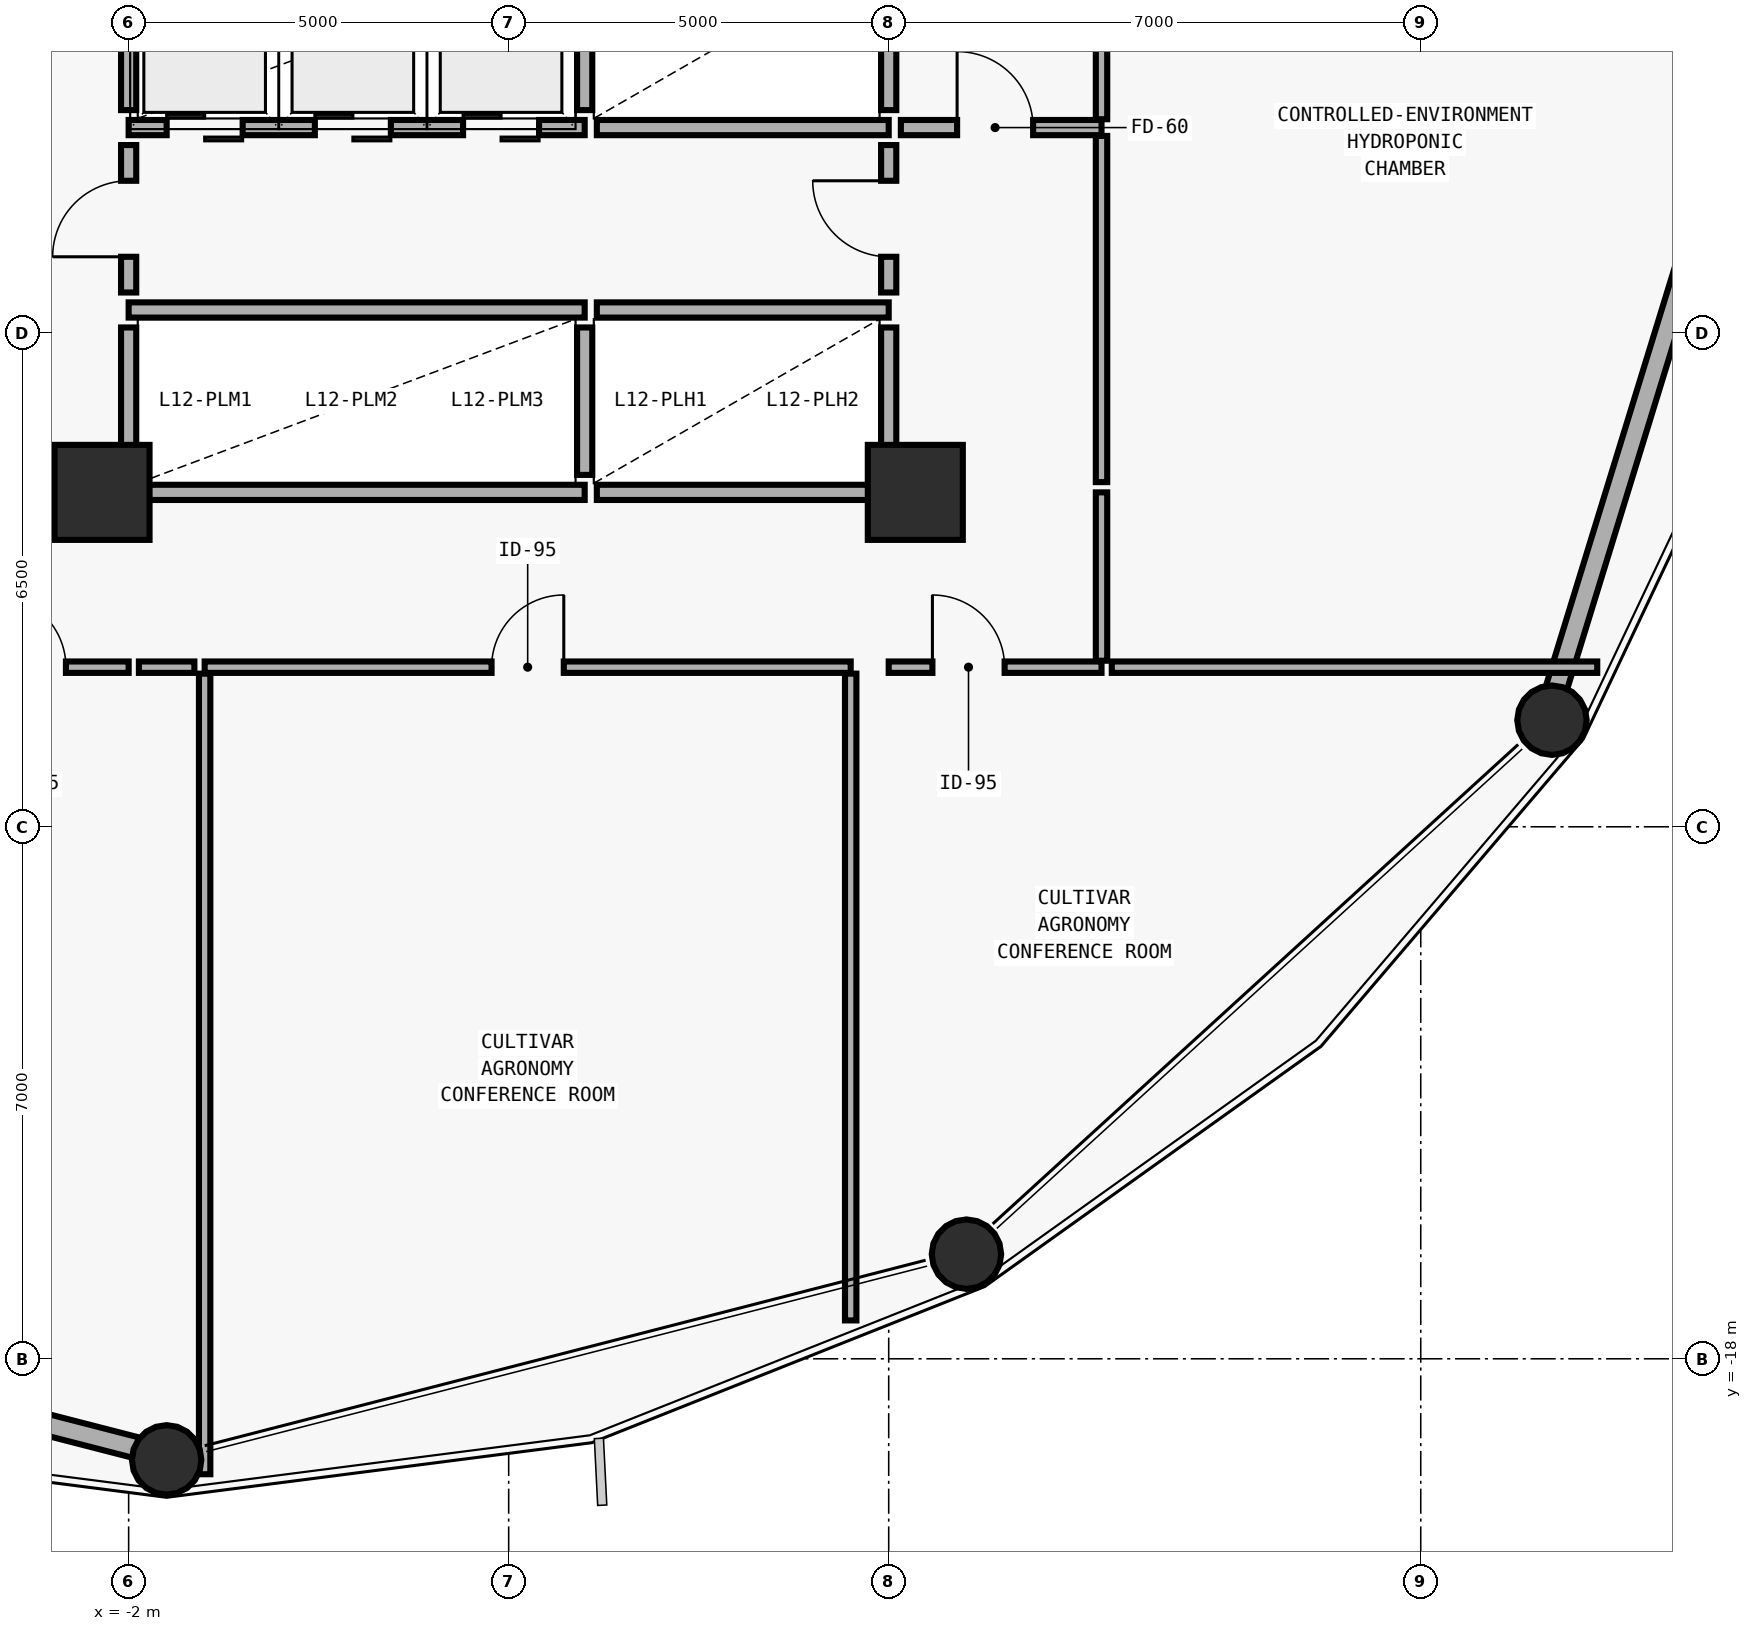
"""IFC4 building model, lengths in metres.
Left out: names, types, materials, properties, quantities, classifications, styles, units other than length and angle.
Written with IfcOpenShell. Run it as: python <this file> out.ifc"""

import sys

from ifc_helpers import new_model, si_unit, direction, frame, frame_2d, origin, origin_2d, place, context, subcontext, project, spatial, rectangle, hollow_circle, extrude, element, fill, save


model = new_model("IFC4")
c1 = context("Model", 3, precision=1e-05, world=origin(), true_north=direction((0.0, 1.0)))
c2 = subcontext(c1, "Body", "Model", "MODEL_VIEW")
j1 = project(units=[si_unit("LENGTHUNIT", "METRE"), si_unit("PLANEANGLEUNIT", "RADIAN")], contexts=[c1])
p1 = place(None, origin())
s1 = spatial("IfcSite", under=j1, at=p1, CompositionType="ELEMENT")
p2 = place(p1, origin())
s2 = spatial("IfcBuilding", under=s1, at=p2, CompositionType="ELEMENT")
p3 = place(p2, frame((0.0, 0.0, 51.0)))
s3 = spatial("IfcBuildingStorey", under=s2, at=p3, CompositionType="ELEMENT", Elevation=51.0)
for number, where, z_axis, x_axis in (
    (1, (-2.35, -6.6, 0.0), (0.0, 0.0, 1.0), (1.0, 0.0, 0.0)),
    (2, (8.35, -6.6, 0.0), (0.0, 0.0, 1.0), (1.0, 0.0, 0.0)),
):
    element("IfcColumn", number, at=place(p3, frame(where, z_axis=z_axis, x_axis=x_axis)), inside=s3, PredefinedType="COLUMN", context=c2, shape_type="SweptSolid", body=[
        extrude(rectangle(XDim=1.25, YDim=1.25, at=origin_2d()), origin(), (0.0, 0.0, 1.0), 3.875),
    ])
p4 = place(p3, frame((-1.5, -19.273, 0.0), z_axis=(0.0, -0.029410155544, 0.999567427816), x_axis=(1.0, 0.0, 0.0)))
e3 = element("IfcColumn", 3, at=p4, inside=s3, PredefinedType="COLUMN", context=c2, shape_type="SweptSolid", body=[
    extrude(hollow_circle(Radius=0.457, WallThickness=0.032, at=origin_2d()), origin(), (0.0, 0.0, 1.0), 3.877),
])
p5 = place(p3, frame((8.987, -16.574, 0.0), z_axis=(0.018828767594, -0.025440876615, 0.999498994151), x_axis=(0.803803843436, 0.594894428682, 0.0)))
e4 = element("IfcColumn", 4, at=p5, inside=s3, PredefinedType="COLUMN", context=c2, shape_type="SweptSolid", body=[
    extrude(hollow_circle(Radius=0.457, WallThickness=0.032, at=origin_2d()), origin(), (0.0, 0.0, 1.0), 3.877),
])
p6 = place(p3, frame((16.663, -9.569, 0.0), z_axis=(0.032615211628, -0.01467054886, 0.99936030688), x_axis=(0.410218260947, 0.911987378414, 0.0)))
e5 = element("IfcColumn", 5, at=p6, inside=s3, PredefinedType="COLUMN", context=c2, shape_type="SweptSolid", body=[
    extrude(hollow_circle(Radius=0.457, WallThickness=0.032, at=origin_2d()), origin(), (0.0, 0.0, 1.0), 3.877),
])
p7 = place(p3, frame((-1.899, -19.17, 0.0), z_axis=(0.0, 0.0, 1.0), x_axis=(-0.968436738327, 0.249259470952, 0.0)))
e6 = element("IfcWall", 6, at=p7, inside=s3, PredefinedType="SOLIDWALL", context=c2, shape_type="SweptSolid", body=[
    extrude(rectangle(XDim=10.004, YDim=0.28, at=frame_2d((5.002, 0.0))), origin(), (0.0, 0.0, 1.0), 3.06),
])
p8 = place(p3, frame((19.487, -0.394, 0.0), z_axis=(0.0, 0.0, 1.0), x_axis=(-0.29412506019, -0.95576694281, 0.0)))
e7 = element("IfcWall", 7, at=p8, inside=s3, PredefinedType="SOLIDWALL", context=c2, shape_type="SweptSolid", body=[
    extrude(rectangle(XDim=9.188, YDim=0.28, at=frame_2d((4.594, 0.0))), origin(), (0.0, 0.0, 1.0), 3.06),
])
p9 = place(p3, frame((-2.0, -1.8, 0.0), z_axis=(0.0, 0.0, 1.0), x_axis=(1.0, 0.0, 0.0)))
e8 = element("IfcWall", 8, at=p9, inside=s3, PredefinedType="SOLIDWALL", context=c2, shape_type="SweptSolid", body=[
    extrude(rectangle(XDim=6.0, YDim=0.2, at=frame_2d((3.0, 0.0))), origin(), (0.0, 0.0, 1.0), 3.64),
])
p10 = place(p9, frame((0.5, 0.0, 0.0)))
e9 = element("IfcOpeningElement", 9, at=p10, cuts=e8, PredefinedType="OPENING", context=c2, shape_type="SweptSolid", body=[
    extrude(rectangle(XDim=1.0, YDim=2.2, at=frame_2d((0.5, 1.1))), frame((0.0, 0.11, 0.0), z_axis=(0.0, -1.0, 0.0), x_axis=(1.0, 0.0, 0.0)), (0.0, 0.0, 1.0), 0.22),
])
p11 = place(p9, frame((2.45, 0.0, 0.0)))
e10 = element("IfcOpeningElement", 10, at=p11, cuts=e8, PredefinedType="OPENING", context=c2, shape_type="SweptSolid", body=[
    extrude(rectangle(XDim=1.0, YDim=2.2, at=frame_2d((0.5, 1.1))), frame((0.0, 0.11, 0.0), z_axis=(0.0, -1.0, 0.0), x_axis=(1.0, 0.0, 0.0)), (0.0, 0.0, 1.0), 0.22),
])
p12 = place(p9, frame((4.4, 0.0, 0.0)))
e11 = element("IfcOpeningElement", 11, at=p12, cuts=e8, PredefinedType="OPENING", context=c2, shape_type="SweptSolid", body=[
    extrude(rectangle(XDim=1.0, YDim=2.2, at=frame_2d((0.5, 1.1))), frame((0.0, 0.11, 0.0), z_axis=(0.0, -1.0, 0.0), x_axis=(1.0, 0.0, 0.0)), (0.0, 0.0, 1.0), 0.22),
])
p13 = place(p3, frame((-2.0, -1.57, 0.0), z_axis=(0.0, 0.0, 1.0), x_axis=(0.0, 1.0, 0.0)))
e12 = element("IfcWall", 12, at=p13, inside=s3, PredefinedType="SOLIDWALL", context=c2, shape_type="SweptSolid", body=[
    extrude(rectangle(XDim=2.05, YDim=0.2, at=frame_2d((1.025, 0.0))), origin(), (0.0, 0.0, 1.0), 3.022),
])
p14 = place(p3, frame((4.16, -1.8, 0.0), z_axis=(0.0, 0.0, 1.0), x_axis=(1.0, 0.0, 0.0)))
e13 = element("IfcWall", 13, at=p14, inside=s3, PredefinedType="SOLIDWALL", context=c2, shape_type="SweptSolid", body=[
    extrude(rectangle(XDim=3.84, YDim=0.2, at=frame_2d((1.92, 0.0))), origin(), (0.0, 0.0, 1.0), 3.64),
])
p15 = place(p3, frame((4.0, -1.57, 0.0), z_axis=(0.0, 0.0, 1.0), x_axis=(0.0, 1.0, 0.0)))
e14 = element("IfcWall", 14, at=p15, inside=s3, PredefinedType="SOLIDWALL", context=c2, shape_type="SweptSolid", body=[
    extrude(rectangle(XDim=1.94, YDim=0.2, at=frame_2d((0.97, 0.0))), origin(), (0.0, 0.0, 1.0), 3.64),
])
p16 = place(p3, frame((8.0, -1.57, 0.0), z_axis=(0.0, 0.0, 1.0), x_axis=(0.0, 1.0, 0.0)))
e15 = element("IfcWall", 15, at=p16, inside=s3, PredefinedType="SOLIDWALL", context=c2, shape_type="SweptSolid", body=[
    extrude(rectangle(XDim=2.05, YDim=0.2, at=frame_2d((1.025, 0.0))), origin(), (0.0, 0.0, 1.0), 3.072),
])
p17 = place(p3, frame((-2.0, -4.2, 0.0), z_axis=(0.0, 0.0, 1.0), x_axis=(1.0, 0.0, 0.0)))
e16 = element("IfcWall", 16, at=p17, inside=s3, PredefinedType="SOLIDWALL", context=c2, shape_type="SweptSolid", body=[
    extrude(rectangle(XDim=6.0, YDim=0.2, at=frame_2d((3.0, 0.0))), origin(), (0.0, 0.0, 1.0), 3.64),
])
p18 = place(p3, frame((-2.0, -6.6, 0.0), z_axis=(0.0, 0.0, 1.0), x_axis=(1.0, 0.0, 0.0)))
e17 = element("IfcWall", 17, at=p18, inside=s3, PredefinedType="SOLIDWALL", context=c2, shape_type="SweptSolid", body=[
    extrude(rectangle(XDim=6.0, YDim=0.2, at=frame_2d((3.0, 0.0))), origin(), (0.0, 0.0, 1.0), 3.122),
])
p19 = place(p3, frame((-2.0, -6.37, 0.0), z_axis=(0.0, 0.0, 1.0), x_axis=(0.0, 1.0, 0.0)))
e18 = element("IfcWall", 18, at=p19, inside=s3, PredefinedType="SOLIDWALL", context=c2, shape_type="SweptSolid", body=[
    extrude(rectangle(XDim=1.94, YDim=0.2, at=frame_2d((0.97, 0.0))), origin(), (0.0, 0.0, 1.0), 3.022),
])
p20 = place(p3, frame((4.16, -4.2, 0.0), z_axis=(0.0, 0.0, 1.0), x_axis=(1.0, 0.0, 0.0)))
e19 = element("IfcWall", 19, at=p20, inside=s3, PredefinedType="SOLIDWALL", context=c2, shape_type="SweptSolid", body=[
    extrude(rectangle(XDim=3.84, YDim=0.2, at=frame_2d((1.92, 0.0))), origin(), (0.0, 0.0, 1.0), 3.64),
])
p21 = place(p3, frame((4.16, -6.6, 0.0), z_axis=(0.0, 0.0, 1.0), x_axis=(1.0, 0.0, 0.0)))
e20 = element("IfcWall", 20, at=p21, inside=s3, PredefinedType="SOLIDWALL", context=c2, shape_type="SweptSolid", body=[
    extrude(rectangle(XDim=3.84, YDim=0.2, at=frame_2d((1.92, 0.0))), origin(), (0.0, 0.0, 1.0), 3.122),
])
p22 = place(p3, frame((4.0, -6.37, 0.0), z_axis=(0.0, 0.0, 1.0), x_axis=(0.0, 1.0, 0.0)))
e21 = element("IfcWall", 21, at=p22, inside=s3, PredefinedType="SOLIDWALL", context=c2, shape_type="SweptSolid", body=[
    extrude(rectangle(XDim=1.94, YDim=0.2, at=frame_2d((0.97, 0.0))), origin(), (0.0, 0.0, 1.0), 3.64),
])
p23 = place(p3, frame((8.0, -6.37, 0.0), z_axis=(0.0, 0.0, 1.0), x_axis=(0.0, 1.0, 0.0)))
e22 = element("IfcWall", 22, at=p23, inside=s3, PredefinedType="SOLIDWALL", context=c2, shape_type="SweptSolid", body=[
    extrude(rectangle(XDim=1.94, YDim=0.2, at=frame_2d((0.97, 0.0))), origin(), (0.0, 0.0, 1.0), 3.072),
])
p24 = place(p3, frame((-2.0, -3.97, 0.0), z_axis=(0.0, 0.0, 1.0), x_axis=(0.0, 1.0, 0.0)))
e23 = element("IfcWall", 23, at=p24, inside=s3, PredefinedType="MOVABLE", context=c2, shape_type="SweptSolid", body=[
    extrude(rectangle(XDim=1.94, YDim=0.2, at=frame_2d((0.97, 0.0))), origin(), (0.0, 0.0, 1.0), 3.022),
])
p25 = place(p24, frame((0.47, 0.0, 0.0)))
e24 = element("IfcOpeningElement", 24, at=p25, cuts=e23, PredefinedType="OPENING", context=c2, shape_type="SweptSolid", body=[
    extrude(rectangle(XDim=1.0, YDim=2.1, at=frame_2d((0.5, 1.05))), frame((0.0, 0.11, 0.0), z_axis=(0.0, -1.0, 0.0), x_axis=(1.0, 0.0, 0.0)), (0.0, 0.0, 1.0), 0.22),
])
p26 = place(p3, frame((8.0, -3.97, 0.0), z_axis=(0.0, 0.0, 1.0), x_axis=(0.0, 1.0, 0.0)))
e25 = element("IfcWall", 25, at=p26, inside=s3, PredefinedType="MOVABLE", context=c2, shape_type="SweptSolid", body=[
    extrude(rectangle(XDim=1.94, YDim=0.2, at=frame_2d((0.97, 0.0))), origin(), (0.0, 0.0, 1.0), 3.072),
])
p27 = place(p26, frame((0.47, 0.0, 0.0)))
e26 = element("IfcOpeningElement", 26, at=p27, cuts=e25, PredefinedType="OPENING", context=c2, shape_type="SweptSolid", body=[
    extrude(rectangle(XDim=1.0, YDim=2.1, at=frame_2d((0.5, 1.05))), frame((0.0, 0.11, 0.0), z_axis=(0.0, -1.0, 0.0), x_axis=(1.0, 0.0, 0.0)), (0.0, 0.0, 1.0), 0.22),
])
p28 = place(p3, frame((8.16, -1.8, 0.0), z_axis=(0.0, 0.0, 1.0), x_axis=(1.0, 0.0, 0.0)))
e27 = element("IfcWall", 27, at=p28, inside=s3, PredefinedType="MOVABLE", context=c2, shape_type="SweptSolid", body=[
    extrude(rectangle(XDim=2.64, YDim=0.2, at=frame_2d((1.32, 0.0))), origin(), (0.0, 0.0, 1.0), 3.64),
])
p29 = place(p28, frame((0.74, 0.0, 0.0)))
e28 = element("IfcOpeningElement", 28, at=p29, cuts=e27, PredefinedType="OPENING", context=c2, shape_type="SweptSolid", body=[
    extrude(rectangle(XDim=1.0, YDim=2.1, at=frame_2d((0.5, 1.05))), frame((0.0, 0.11, 0.0), z_axis=(0.0, -1.0, 0.0), x_axis=(1.0, 0.0, 0.0)), (0.0, 0.0, 1.0), 0.22),
])
p30 = place(p3, frame((-4.6, -8.9, 0.0), z_axis=(0.0, 0.0, 1.0), x_axis=(1.0, 0.0, 0.0)))
e29 = element("IfcWall", 29, at=p30, inside=s3, PredefinedType="PARTITIONING", context=c2, shape_type="SweptSolid", body=[
    extrude(rectangle(XDim=2.6, YDim=0.15, at=frame_2d((1.3, 0.0))), origin(), (0.0, 0.0, 1.0), 3.64),
])
p31 = place(p30, frame((0.825, 0.0, 0.0)))
e30 = element("IfcOpeningElement", 30, at=p31, cuts=e29, PredefinedType="OPENING", context=c2, shape_type="SweptSolid", body=[
    extrude(rectangle(XDim=0.95, YDim=2.1, at=frame_2d((0.475, 1.05))), frame((0.0, 0.085, 0.0), z_axis=(0.0, -1.0, 0.0), x_axis=(1.0, 0.0, 0.0)), (0.0, 0.0, 1.0), 0.17),
])
p32 = place(p3, frame((-1.0, -8.9, 0.0), z_axis=(0.0, 0.0, 1.0), x_axis=(1.0, 0.0, 0.0)))
e31 = element("IfcWall", 31, at=p32, inside=s3, PredefinedType="PARTITIONING", context=c2, shape_type="SweptSolid", body=[
    extrude(rectangle(XDim=8.5, YDim=0.15, at=frame_2d((4.25, 0.0))), origin(), (0.0, 0.0, 1.0), 3.64),
])
p33 = place(p32, frame((3.775, 0.0, 0.0)))
e32 = element("IfcOpeningElement", 32, at=p33, cuts=e31, PredefinedType="OPENING", context=c2, shape_type="SweptSolid", body=[
    extrude(rectangle(XDim=0.95, YDim=2.1, at=frame_2d((0.475, 1.05))), frame((0.0, 0.085, 0.0), z_axis=(0.0, -1.0, 0.0), x_axis=(1.0, 0.0, 0.0)), (0.0, 0.0, 1.0), 0.17),
])
p34 = place(p3, frame((8.0, -8.9, 0.0), z_axis=(0.0, 0.0, 1.0), x_axis=(1.0, 0.0, 0.0)))
e33 = element("IfcWall", 33, at=p34, inside=s3, PredefinedType="PARTITIONING", context=c2, shape_type="SweptSolid", body=[
    extrude(rectangle(XDim=2.8, YDim=0.15, at=frame_2d((1.4, 0.0))), origin(), (0.0, 0.0, 1.0), 3.64),
])
p35 = place(p34, frame((0.575, 0.0, 0.0)))
e34 = element("IfcOpeningElement", 34, at=p35, cuts=e33, PredefinedType="OPENING", context=c2, shape_type="SweptSolid", body=[
    extrude(rectangle(XDim=0.95, YDim=2.1, at=frame_2d((0.475, 1.05))), frame((0.0, 0.085, 0.0), z_axis=(0.0, -1.0, 0.0), x_axis=(1.0, 0.0, 0.0)), (0.0, 0.0, 1.0), 0.17),
])
p36 = place(p3, frame((10.8, -1.69, 0.0), z_axis=(0.0, 0.0, 1.0), x_axis=(0.0, 1.0, 0.0)))
e35 = element("IfcWall", 35, at=p36, inside=s3, PredefinedType="PARTITIONING", context=c2, shape_type="SweptSolid", body=[
    extrude(rectangle(XDim=5.19, YDim=0.15, at=frame_2d((2.595, 0.0))), origin(), (0.0, 0.0, 1.0), 3.64),
])
p37 = place(p36, frame((2.065, 0.0, 0.0)))
e36 = element("IfcOpeningElement", 36, at=p37, cuts=e35, PredefinedType="OPENING", context=c2, shape_type="SweptSolid", body=[
    extrude(rectangle(XDim=0.95, YDim=2.1, at=frame_2d((0.475, 1.05))), frame((0.0, 0.085, 0.0), z_axis=(0.0, -1.0, 0.0), x_axis=(1.0, 0.0, 0.0)), (0.0, 0.0, 1.0), 0.17),
])
p38 = place(p3, frame((-1.865, -8.9, 0.0), z_axis=(0.0, 0.0, 1.0), x_axis=(1.0, 0.0, 0.0)))
e37 = element("IfcWall", 37, at=p38, inside=s3, PredefinedType="PARTITIONING", context=c2, shape_type="SweptSolid", body=[
    extrude(rectangle(XDim=0.73, YDim=0.15, at=frame_2d((0.365, 0.0))), origin(), (0.0, 0.0, 1.0), 3.64),
])
p39 = place(p3, frame((-1.0, -8.985, 0.0), z_axis=(0.0, 0.0, 1.0), x_axis=(0.0, -1.0, 0.0)))
e38 = element("IfcWall", 38, at=p39, inside=s3, PredefinedType="PARTITIONING", context=c2, shape_type="SweptSolid", body=[
    extrude(rectangle(XDim=10.534, YDim=0.15, at=frame_2d((5.267, 0.0))), origin(), (0.0, 0.0, 1.0), 2.972),
])
p40 = place(p3, frame((7.5, -8.985, 0.0), z_axis=(0.0, 0.0, 1.0), x_axis=(0.0, -1.0, 0.0)))
e39 = element("IfcWall", 39, at=p40, inside=s3, PredefinedType="PARTITIONING", context=c2, shape_type="SweptSolid", body=[
    extrude(rectangle(XDim=8.51, YDim=0.15, at=frame_2d((4.255, 0.0))), origin(), (0.0, 0.0, 1.0), 3.64),
])
p41 = place(p3, frame((10.935, -8.9, 0.0), z_axis=(0.0, 0.0, 1.0), x_axis=(1.0, 0.0, 0.0)))
e40 = element("IfcWall", 40, at=p41, inside=s3, PredefinedType="PARTITIONING", context=c2, shape_type="SweptSolid", body=[
    extrude(rectangle(XDim=6.387, YDim=0.15, at=frame_2d((3.193, 0.0))), origin(), (0.0, 0.0, 1.0), 2.972),
])
p42 = place(p3, frame((10.8, -8.815, 0.0), z_axis=(0.0, 0.0, 1.0), x_axis=(0.0, 1.0, 0.0)))
e41 = element("IfcWall", 41, at=p42, inside=s3, PredefinedType="PARTITIONING", context=c2, shape_type="SweptSolid", body=[
    extrude(rectangle(XDim=2.215, YDim=0.15, at=frame_2d((1.107, 0.0))), origin(), (0.0, 0.0, 1.0), 3.64),
])
p43 = place(p3, frame((10.8, -6.465, 0.0), z_axis=(0.0, 0.0, 1.0), x_axis=(0.0, 1.0, 0.0)))
e42 = element("IfcWall", 42, at=p43, inside=s3, PredefinedType="PARTITIONING", context=c2, shape_type="SweptSolid", body=[
    extrude(rectangle(XDim=4.555, YDim=0.15, at=frame_2d((2.278, 0.0))), origin(), (0.0, 0.0, 1.0), 3.64),
])
p44 = place(p25, origin())
e43 = element("IfcDoor", 43, at=p44, inside=s3, OperationType="SINGLE_SWING_LEFT", PredefinedType="DOOR", context=c2, shape_type="SweptSolid", body=[
    extrude(rectangle(XDim=1.0, YDim=2.1, at=frame_2d((0.5, 1.05))), frame((0.0, 0.025, 0.0), z_axis=(0.0, -1.0, 0.0), x_axis=(1.0, 0.0, 0.0)), (0.0, 0.0, 1.0), 0.05),
])
fill(e24, e43)
p45 = place(p27, origin())
e44 = element("IfcDoor", 44, at=p45, inside=s3, OperationType="SINGLE_SWING_RIGHT", PredefinedType="DOOR", context=c2, shape_type="SweptSolid", body=[
    extrude(rectangle(XDim=1.0, YDim=2.1, at=frame_2d((0.5, 1.05))), frame((0.0, 0.025, 0.0), z_axis=(0.0, -1.0, 0.0), x_axis=(1.0, 0.0, 0.0)), (0.0, 0.0, 1.0), 0.05),
])
fill(e26, e44)
p46 = place(p29, origin())
e45 = element("IfcDoor", 45, at=p46, inside=s3, OperationType="SINGLE_SWING_LEFT", PredefinedType="DOOR", context=c2, shape_type="SweptSolid", body=[
    extrude(rectangle(XDim=1.0, YDim=2.1, at=frame_2d((0.5, 1.05))), frame((0.0, 0.025, 0.0), z_axis=(0.0, -1.0, 0.0), x_axis=(1.0, 0.0, 0.0)), (0.0, 0.0, 1.0), 0.05),
])
fill(e28, e45)
p47 = place(p31, origin())
e46 = element("IfcDoor", 46, at=p47, inside=s3, OperationType="SINGLE_SWING_LEFT", PredefinedType="DOOR", context=c2, shape_type="SweptSolid", body=[
    extrude(rectangle(XDim=0.95, YDim=2.1, at=frame_2d((0.475, 1.05))), frame((0.0, 0.025, 0.0), z_axis=(0.0, -1.0, 0.0), x_axis=(1.0, 0.0, 0.0)), (0.0, 0.0, 1.0), 0.05),
])
fill(e30, e46)
p48 = place(p33, origin())
e47 = element("IfcDoor", 47, at=p48, inside=s3, OperationType="SINGLE_SWING_RIGHT", PredefinedType="DOOR", context=c2, shape_type="SweptSolid", body=[
    extrude(rectangle(XDim=0.95, YDim=2.1, at=frame_2d((0.475, 1.05))), frame((0.0, 0.025, 0.0), z_axis=(0.0, -1.0, 0.0), x_axis=(1.0, 0.0, 0.0)), (0.0, 0.0, 1.0), 0.05),
])
fill(e32, e47)
p49 = place(p35, origin())
e48 = element("IfcDoor", 48, at=p49, inside=s3, OperationType="SINGLE_SWING_LEFT", PredefinedType="DOOR", context=c2, shape_type="SweptSolid", body=[
    extrude(rectangle(XDim=0.95, YDim=2.1, at=frame_2d((0.475, 1.05))), frame((0.0, 0.025, 0.0), z_axis=(0.0, -1.0, 0.0), x_axis=(1.0, 0.0, 0.0)), (0.0, 0.0, 1.0), 0.05),
])
fill(e34, e48)
p50 = place(p10, origin())
e49 = element("IfcDoor", 49, at=p50, inside=s3, OperationType="DOUBLE_DOOR_SLIDING", PredefinedType="DOOR", context=c2, shape_type="SweptSolid", body=[
    extrude(rectangle(XDim=1.0, YDim=2.2, at=frame_2d((0.5, 1.1))), frame((0.0, 0.025, 0.0), z_axis=(0.0, -1.0, 0.0), x_axis=(1.0, 0.0, 0.0)), (0.0, 0.0, 1.0), 0.05),
])
fill(e9, e49)
p51 = place(p11, origin())
e50 = element("IfcDoor", 50, at=p51, inside=s3, OperationType="DOUBLE_DOOR_SLIDING", PredefinedType="DOOR", context=c2, shape_type="SweptSolid", body=[
    extrude(rectangle(XDim=1.0, YDim=2.2, at=frame_2d((0.5, 1.1))), frame((0.0, 0.025, 0.0), z_axis=(0.0, -1.0, 0.0), x_axis=(1.0, 0.0, 0.0)), (0.0, 0.0, 1.0), 0.05),
])
fill(e10, e50)
p52 = place(p12, origin())
e51 = element("IfcDoor", 51, at=p52, inside=s3, OperationType="DOUBLE_DOOR_SLIDING", PredefinedType="DOOR", context=c2, shape_type="SweptSolid", body=[
    extrude(rectangle(XDim=1.0, YDim=2.2, at=frame_2d((0.5, 1.1))), frame((0.0, 0.025, 0.0), z_axis=(0.0, -1.0, 0.0), x_axis=(1.0, 0.0, 0.0)), (0.0, 0.0, 1.0), 0.05),
])
fill(e11, e51)
save(model, sys.argv[1])
